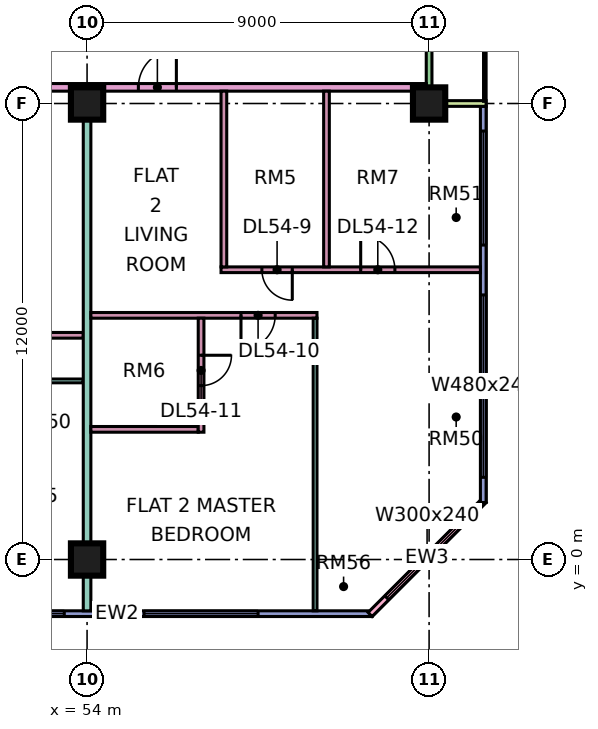
"""IFC4 building model, lengths in metres.
Left out: names, types, materials, properties, quantities, classifications, styles, units other than length and angle.
Written with IfcOpenShell. Run it as: python <this file> out.ifc"""

import sys

from ifc_helpers import new_model, si_unit, direction, frame, frame_2d, origin, origin_2d, place, context, subcontext, project, spatial, rectangle, extrude, element, fill, save


model = new_model("IFC4")
c1 = context("Model", 3, precision=1e-05, world=origin(), true_north=direction((0.0, 1.0)))
c2 = subcontext(c1, "Body", "Model", "MODEL_VIEW")
j1 = project(units=[si_unit("LENGTHUNIT", "METRE"), si_unit("PLANEANGLEUNIT", "RADIAN")], contexts=[c1])
p1 = place(None, origin())
s1 = spatial("IfcSite", under=j1, at=p1, CompositionType="ELEMENT")
p2 = place(p1, origin())
s2 = spatial("IfcBuilding", under=s1, at=p2, CompositionType="ELEMENT")
p3 = place(p2, frame((0.0, 0.0, 230.4)))
s3 = spatial("IfcBuildingStorey", under=s2, at=p3, CompositionType="ELEMENT", Elevation=230.4)
for number, where, z_axis, x_axis in (
    (1, (54.0, 0.0, 0.0), (0.0, 0.0, 1.0), (1.0, 0.0, 0.0)),
    (2, (54.0, 12.0, 0.0), (0.0, 0.0, 1.0), (1.0, 0.0, 0.0)),
    (3, (63.0, 12.0, 0.0), (0.0, 0.0, 1.0), (1.0, 0.0, 0.0)),
):
    element("IfcColumn", number, at=place(p3, frame(where, z_axis=z_axis, x_axis=x_axis)), inside=s3, PredefinedType="COLUMN", context=c2, shape_type="SweptSolid", body=[
        extrude(rectangle(XDim=0.85, YDim=0.85, at=origin_2d()), origin(), (0.0, 0.0, 1.0), 3.75),
    ])
p4 = place(p3, frame((48.075, -1.425, 0.0), z_axis=(0.0, 0.0, 1.0), x_axis=(1.0, 0.0, 0.0)))
e4 = element("IfcWall", 4, at=p4, inside=s3, PredefinedType="SOLIDWALL", context=c2, shape_type="SweptSolid", body=[
    extrude(rectangle(XDim=13.425, YDim=0.15, at=frame_2d((6.712, 0.0))), origin(), (0.0, 0.0, 1.0), 3.35),
])
p5 = place(p4, frame((0.562, 0.0, 0.45)))
e5 = element("IfcOpeningElement", 5, at=p5, cuts=e4, PredefinedType="OPENING", context=c2, shape_type="SweptSolid", body=[
    extrude(rectangle(XDim=1.8, YDim=2.4, at=frame_2d((0.9, 1.2))), frame((0.0, 0.085, 0.0), z_axis=(0.0, -1.0, 0.0), x_axis=(1.0, 0.0, 0.0)), (0.0, 0.0, 1.0), 0.17),
])
p6 = place(p4, frame((3.525, 0.0, 0.45)))
e6 = element("IfcOpeningElement", 6, at=p6, cuts=e4, PredefinedType="OPENING", context=c2, shape_type="SweptSolid", body=[
    extrude(rectangle(XDim=1.8, YDim=2.4, at=frame_2d((0.9, 1.2))), frame((0.0, 0.085, 0.0), z_axis=(0.0, -1.0, 0.0), x_axis=(1.0, 0.0, 0.0)), (0.0, 0.0, 1.0), 0.17),
])
p7 = place(p4, frame((7.425, 0.0, 0.45)))
e7 = element("IfcOpeningElement", 7, at=p7, cuts=e4, PredefinedType="OPENING", context=c2, shape_type="SweptSolid", body=[
    extrude(rectangle(XDim=3.0, YDim=2.4, at=frame_2d((1.5, 1.2))), frame((0.0, 0.085, 0.0), z_axis=(0.0, -1.0, 0.0), x_axis=(1.0, 0.0, 0.0)), (0.0, 0.0, 1.0), 0.17),
])
p8 = place(p3, frame((61.447, -1.447, 0.0), z_axis=(0.0, 0.0, 1.0), x_axis=(0.707106781187, 0.707106781187, 0.0)))
e8 = element("IfcWall", 8, at=p8, inside=s3, PredefinedType="SOLIDWALL", context=c2, shape_type="SweptSolid", body=[
    extrude(rectangle(XDim=4.243, YDim=0.15, at=frame_2d((2.121, 0.0))), origin(), (0.0, 0.0, 1.0), 3.35),
])
p9 = place(p8, frame((0.621, 0.0, 0.45)))
e9 = element("IfcOpeningElement", 9, at=p9, cuts=e8, PredefinedType="OPENING", context=c2, shape_type="SweptSolid", body=[
    extrude(rectangle(XDim=3.0, YDim=2.4, at=frame_2d((1.5, 1.2))), frame((0.0, 0.085, 0.0), z_axis=(0.0, -1.0, 0.0), x_axis=(1.0, 0.0, 0.0)), (0.0, 0.0, 1.0), 0.17),
])
p10 = place(p3, frame((64.425, 1.5, 0.0), z_axis=(0.0, 0.0, 1.0), x_axis=(0.0, 1.0, 0.0)))
e10 = element("IfcWall", 10, at=p10, inside=s3, PredefinedType="SOLIDWALL", context=c2, shape_type="SweptSolid", body=[
    extrude(rectangle(XDim=10.425, YDim=0.15, at=frame_2d((5.212, 0.0))), origin(), (0.0, 0.0, 1.0), 3.35),
])
p11 = place(p10, frame((0.663, 0.0, 0.45)))
e11 = element("IfcOpeningElement", 11, at=p11, cuts=e10, PredefinedType="OPENING", context=c2, shape_type="SweptSolid", body=[
    extrude(rectangle(XDim=4.8, YDim=2.4, at=frame_2d((2.4, 1.2))), frame((0.0, 0.085, 0.0), z_axis=(0.0, -1.0, 0.0), x_axis=(1.0, 0.0, 0.0)), (0.0, 0.0, 1.0), 0.17),
])
p12 = place(p10, frame((6.775, 0.0, 0.45)))
e12 = element("IfcOpeningElement", 12, at=p12, cuts=e10, PredefinedType="OPENING", context=c2, shape_type="SweptSolid", body=[
    extrude(rectangle(XDim=3.0, YDim=2.4, at=frame_2d((1.5, 1.2))), frame((0.0, 0.085, 0.0), z_axis=(0.0, -1.0, 0.0), x_axis=(1.0, 0.0, 0.0)), (0.0, 0.0, 1.0), 0.17),
])
p13 = place(p3, frame((63.0, 12.075, 0.0), z_axis=(0.0, 0.0, 1.0), x_axis=(0.0, 1.0, 0.0)))
e13 = element("IfcWall", 13, at=p13, inside=s3, PredefinedType="SOLIDWALL", context=c2, shape_type="SweptSolid", body=[
    extrude(rectangle(XDim=10.35, YDim=0.15, at=frame_2d((5.175, 0.0))), origin(), (0.0, 0.0, 1.0), 3.35),
])
p14 = place(p13, frame((3.975, 0.0, 0.45)))
e14 = element("IfcOpeningElement", 14, at=p14, cuts=e13, PredefinedType="OPENING", context=c2, shape_type="SweptSolid", body=[
    extrude(rectangle(XDim=1.8, YDim=2.4, at=frame_2d((0.9, 1.2))), frame((0.0, 0.085, 0.0), z_axis=(0.0, -1.0, 0.0), x_axis=(1.0, 0.0, 0.0)), (0.0, 0.0, 1.0), 0.17),
])
p15 = place(p13, frame((7.387, 0.0, 0.0)))
e15 = element("IfcOpeningElement", 15, at=p15, cuts=e13, PredefinedType="OPENING", context=c2, shape_type="SweptSolid", body=[
    extrude(rectangle(XDim=1.8, YDim=2.4, at=frame_2d((0.9, 1.2))), frame((0.0, 0.085, 0.0), z_axis=(0.0, -1.0, 0.0), x_axis=(1.0, 0.0, 0.0)), (0.0, 0.0, 1.0), 0.17),
])
p16 = place(p3, frame((64.5, 12.0, 0.0), z_axis=(0.0, 0.0, 1.0), x_axis=(-1.0, 0.0, 0.0)))
e16 = element("IfcWall", 16, at=p16, inside=s3, PredefinedType="SOLIDWALL", context=c2, shape_type="SweptSolid", body=[
    extrude(rectangle(XDim=1.5, YDim=0.15, at=frame_2d((0.75, 0.0))), origin(), (0.0, 0.0, 1.0), 3.35),
])
p17 = place(p3, frame((33.05, 4.7, 0.0), z_axis=(0.0, 0.0, 1.0), x_axis=(1.0, 0.0, 0.0)))
e17 = element("IfcWall", 17, at=p17, inside=s3, PredefinedType="PARTITIONING", context=c2, shape_type="SweptSolid", body=[
    extrude(rectangle(XDim=20.85, YDim=0.1, at=frame_2d((10.425, 0.0))), origin(), (0.0, 0.0, 1.0), 3.35),
])
p18 = place(p17, frame((1.0, 0.0, 0.0)))
e18 = element("IfcOpeningElement", 18, at=p18, cuts=e17, PredefinedType="OPENING", context=c2, shape_type="SweptSolid", body=[
    extrude(rectangle(XDim=0.9, YDim=2.1, at=frame_2d((0.45, 1.05))), frame((0.0, 0.06, 0.0), z_axis=(0.0, -1.0, 0.0), x_axis=(1.0, 0.0, 0.0)), (0.0, 0.0, 1.0), 0.12),
])
p19 = place(p17, frame((4.0, 0.0, 0.0)))
e19 = element("IfcOpeningElement", 19, at=p19, cuts=e17, PredefinedType="OPENING", context=c2, shape_type="SweptSolid", body=[
    extrude(rectangle(XDim=0.9, YDim=2.1, at=frame_2d((0.45, 1.05))), frame((0.0, 0.06, 0.0), z_axis=(0.0, -1.0, 0.0), x_axis=(1.0, 0.0, 0.0)), (0.0, 0.0, 1.0), 0.12),
])
p20 = place(p17, frame((7.0, 0.0, 0.0)))
e20 = element("IfcOpeningElement", 20, at=p20, cuts=e17, PredefinedType="OPENING", context=c2, shape_type="SweptSolid", body=[
    extrude(rectangle(XDim=0.9, YDim=2.1, at=frame_2d((0.45, 1.05))), frame((0.0, 0.06, 0.0), z_axis=(0.0, -1.0, 0.0), x_axis=(1.0, 0.0, 0.0)), (0.0, 0.0, 1.0), 0.12),
])
p21 = place(p17, frame((19.0, 0.0, 0.0)))
e21 = element("IfcOpeningElement", 21, at=p21, cuts=e17, PredefinedType="OPENING", context=c2, shape_type="SweptSolid", body=[
    extrude(rectangle(XDim=0.9, YDim=2.1, at=frame_2d((0.45, 1.05))), frame((0.0, 0.06, 0.0), z_axis=(0.0, -1.0, 0.0), x_axis=(1.0, 0.0, 0.0)), (0.0, 0.0, 1.0), 0.12),
])
p22 = place(p17, frame((13.0, 0.0, 0.0)))
e22 = element("IfcOpeningElement", 22, at=p22, cuts=e17, PredefinedType="OPENING", context=c2, shape_type="SweptSolid", body=[
    extrude(rectangle(XDim=0.9, YDim=2.1, at=frame_2d((0.45, 1.05))), frame((0.0, 0.06, 0.0), z_axis=(0.0, -1.0, 0.0), x_axis=(1.0, 0.0, 0.0)), (0.0, 0.0, 1.0), 0.12),
])
p23 = place(p3, frame((40.65, 12.425, 0.0), z_axis=(0.0, 0.0, 1.0), x_axis=(1.0, 0.0, 0.0)))
e23 = element("IfcWall", 23, at=p23, inside=s3, PredefinedType="PARTITIONING", context=c2, shape_type="SweptSolid", body=[
    extrude(rectangle(XDim=22.276, YDim=0.2, at=frame_2d((11.138, 0.0))), origin(), (0.0, 0.0, 1.0), 3.35),
])
p24 = place(p23, frame((14.7, 0.0, 0.0)))
e24 = element("IfcOpeningElement", 24, at=p24, cuts=e23, PredefinedType="OPENING", context=c2, shape_type="SweptSolid", body=[
    extrude(rectangle(XDim=1.0, YDim=2.1, at=frame_2d((0.5, 1.05))), frame((0.0, 0.11, 0.0), z_axis=(0.0, -1.0, 0.0), x_axis=(1.0, 0.0, 0.0)), (0.0, 0.0, 1.0), 0.22),
])
p25 = place(p23, frame((1.05, 0.0, 0.0)))
e25 = element("IfcOpeningElement", 25, at=p25, cuts=e23, PredefinedType="OPENING", context=c2, shape_type="SweptSolid", body=[
    extrude(rectangle(XDim=1.0, YDim=2.1, at=frame_2d((0.5, 1.05))), frame((0.0, 0.11, 0.0), z_axis=(0.0, -1.0, 0.0), x_axis=(1.0, 0.0, 0.0)), (0.0, 0.0, 1.0), 0.22),
])
p26 = place(p3, frame((43.575, 5.9, 0.0), z_axis=(0.0, 0.0, 1.0), x_axis=(1.0, 0.0, 0.0)))
e26 = element("IfcWall", 26, at=p26, inside=s3, PredefinedType="PARTITIONING", context=c2, shape_type="SweptSolid", body=[
    extrude(rectangle(XDim=10.325, YDim=0.15, at=frame_2d((5.163, 0.0))), origin(), (0.0, 0.0, 1.0), 3.35),
])
p27 = place(p26, frame((1.825, 0.0, 0.0)))
e27 = element("IfcOpeningElement", 27, at=p27, cuts=e26, PredefinedType="OPENING", context=c2, shape_type="SweptSolid", body=[
    extrude(rectangle(XDim=0.8, YDim=2.1, at=frame_2d((0.4, 1.05))), frame((0.0, 0.085, 0.0), z_axis=(0.0, -1.0, 0.0), x_axis=(1.0, 0.0, 0.0)), (0.0, 0.0, 1.0), 0.17),
])
p28 = place(p26, frame((6.975, 0.0, 0.0)))
e28 = element("IfcOpeningElement", 28, at=p28, cuts=e26, PredefinedType="OPENING", context=c2, shape_type="SweptSolid", body=[
    extrude(rectangle(XDim=0.9, YDim=2.1, at=frame_2d((0.45, 1.05))), frame((0.0, 0.085, 0.0), z_axis=(0.0, -1.0, 0.0), x_axis=(1.0, 0.0, 0.0)), (0.0, 0.0, 1.0), 0.17),
])
p29 = place(p3, frame((54.0, -1.351, 0.0), z_axis=(0.0, 0.0, 1.0), x_axis=(0.0, 1.0, 0.0)))
e29 = element("IfcWall", 29, at=p29, inside=s3, PredefinedType="PARTITIONING", context=c2, shape_type="SweptSolid", body=[
    extrude(rectangle(XDim=13.676, YDim=0.2, at=frame_2d((6.838, 0.0))), origin(), (0.0, 0.0, 1.0), 3.35),
])
p30 = place(p3, frame((54.1, 3.425, 0.0), z_axis=(0.0, 0.0, 1.0), x_axis=(1.0, 0.0, 0.0)))
e30 = element("IfcWall", 30, at=p30, inside=s3, PredefinedType="PARTITIONING", context=c2, shape_type="SweptSolid", body=[
    extrude(rectangle(XDim=2.825, YDim=0.15, at=frame_2d((1.413, 0.0))), origin(), (0.0, 0.0, 1.0), 3.35),
])
p31 = place(p3, frame((54.1, 6.425, 0.0), z_axis=(0.0, 0.0, 1.0), x_axis=(1.0, 0.0, 0.0)))
e31 = element("IfcWall", 31, at=p31, inside=s3, PredefinedType="PARTITIONING", context=c2, shape_type="SweptSolid", body=[
    extrude(rectangle(XDim=5.95, YDim=0.15, at=frame_2d((2.975, 0.0))), origin(), (0.0, 0.0, 1.0), 3.35),
])
p32 = place(p31, frame((3.95, 0.0, 0.0)))
e32 = element("IfcOpeningElement", 32, at=p32, cuts=e31, PredefinedType="OPENING", context=c2, shape_type="SweptSolid", body=[
    extrude(rectangle(XDim=0.9, YDim=2.1, at=frame_2d((0.45, 1.05))), frame((0.0, 0.085, 0.0), z_axis=(0.0, -1.0, 0.0), x_axis=(1.0, 0.0, 0.0)), (0.0, 0.0, 1.0), 0.17),
])
p33 = place(p3, frame((57.0, 3.35, 0.0), z_axis=(0.0, 0.0, 1.0), x_axis=(0.0, 1.0, 0.0)))
e33 = element("IfcWall", 33, at=p33, inside=s3, PredefinedType="PARTITIONING", context=c2, shape_type="SweptSolid", body=[
    extrude(rectangle(XDim=3.0, YDim=0.15, at=frame_2d((1.5, 0.0))), origin(), (0.0, 0.0, 1.0), 3.35),
])
p34 = place(p33, frame((1.225, 0.0, 0.0)))
e34 = element("IfcOpeningElement", 34, at=p34, cuts=e33, PredefinedType="OPENING", context=c2, shape_type="SweptSolid", body=[
    extrude(rectangle(XDim=0.8, YDim=2.1, at=frame_2d((0.4, 1.05))), frame((0.0, 0.085, 0.0), z_axis=(0.0, -1.0, 0.0), x_axis=(1.0, 0.0, 0.0)), (0.0, 0.0, 1.0), 0.17),
])
p35 = place(p3, frame((57.525, 7.625, 0.0), z_axis=(0.0, 0.0, 1.0), x_axis=(1.0, 0.0, 0.0)))
e35 = element("IfcWall", 35, at=p35, inside=s3, PredefinedType="PARTITIONING", context=c2, shape_type="SweptSolid", body=[
    extrude(rectangle(XDim=6.825, YDim=0.15, at=frame_2d((3.413, 0.0))), origin(), (0.0, 0.0, 1.0), 3.35),
])
p36 = place(p35, frame((1.075, 0.0, 0.0)))
e36 = element("IfcOpeningElement", 36, at=p36, cuts=e35, PredefinedType="OPENING", context=c2, shape_type="SweptSolid", body=[
    extrude(rectangle(XDim=0.8, YDim=2.1, at=frame_2d((0.4, 1.05))), frame((0.0, 0.085, 0.0), z_axis=(0.0, -1.0, 0.0), x_axis=(1.0, 0.0, 0.0)), (0.0, 0.0, 1.0), 0.17),
])
p37 = place(p35, frame((3.675, 0.0, 0.0)))
e37 = element("IfcOpeningElement", 37, at=p37, cuts=e35, PredefinedType="OPENING", context=c2, shape_type="SweptSolid", body=[
    extrude(rectangle(XDim=0.9, YDim=2.1, at=frame_2d((0.45, 1.05))), frame((0.0, 0.085, 0.0), z_axis=(0.0, -1.0, 0.0), x_axis=(1.0, 0.0, 0.0)), (0.0, 0.0, 1.0), 0.17),
])
p38 = place(p3, frame((57.6, 7.7, 0.0), z_axis=(0.0, 0.0, 1.0), x_axis=(0.0, 1.0, 0.0)))
e38 = element("IfcWall", 38, at=p38, inside=s3, PredefinedType="PARTITIONING", context=c2, shape_type="SweptSolid", body=[
    extrude(rectangle(XDim=4.625, YDim=0.15, at=frame_2d((2.312, 0.0))), origin(), (0.0, 0.0, 1.0), 3.35),
])
p39 = place(p3, frame((60.0, -1.35, 0.0), z_axis=(0.0, 0.0, 1.0), x_axis=(0.0, 1.0, 0.0)))
e39 = element("IfcWall", 39, at=p39, inside=s3, PredefinedType="PARTITIONING", context=c2, shape_type="SweptSolid", body=[
    extrude(rectangle(XDim=7.7, YDim=0.1, at=frame_2d((3.85, 0.0))), origin(), (0.0, 0.0, 1.0), 3.35),
])
p40 = place(p3, frame((60.3, 7.7, 0.0), z_axis=(0.0, 0.0, 1.0), x_axis=(0.0, 1.0, 0.0)))
e40 = element("IfcWall", 40, at=p40, inside=s3, PredefinedType="PARTITIONING", context=c2, shape_type="SweptSolid", body=[
    extrude(rectangle(XDim=4.625, YDim=0.15, at=frame_2d((2.312, 0.0))), origin(), (0.0, 0.0, 1.0), 3.35),
])
p41 = place(p6, origin())
e41 = element("IfcWindow", 41, at=p41, inside=s3, PartitioningType="SINGLE_PANEL", PredefinedType="WINDOW", context=c2, shape_type="SweptSolid", body=[
    extrude(rectangle(XDim=1.8, YDim=2.4, at=frame_2d((0.9, 1.2))), frame((0.0, 0.03, 0.0), z_axis=(0.0, -1.0, 0.0), x_axis=(1.0, 0.0, 0.0)), (0.0, 0.0, 1.0), 0.06),
])
fill(e6, e41)
p42 = place(p7, origin())
e42 = element("IfcWindow", 42, at=p42, inside=s3, PartitioningType="SINGLE_PANEL", PredefinedType="WINDOW", context=c2, shape_type="SweptSolid", body=[
    extrude(rectangle(XDim=3.0, YDim=2.4, at=frame_2d((1.5, 1.2))), frame((0.0, 0.03, 0.0), z_axis=(0.0, -1.0, 0.0), x_axis=(1.0, 0.0, 0.0)), (0.0, 0.0, 1.0), 0.06),
])
fill(e7, e42)
p43 = place(p9, origin())
e43 = element("IfcWindow", 43, at=p43, inside=s3, PartitioningType="SINGLE_PANEL", PredefinedType="WINDOW", context=c2, shape_type="SweptSolid", body=[
    extrude(rectangle(XDim=3.0, YDim=2.4, at=frame_2d((1.5, 1.2))), frame((0.0, 0.03, 0.0), z_axis=(0.0, -1.0, 0.0), x_axis=(1.0, 0.0, 0.0)), (0.0, 0.0, 1.0), 0.06),
])
fill(e9, e43)
p44 = place(p11, origin())
e44 = element("IfcWindow", 44, at=p44, inside=s3, PartitioningType="SINGLE_PANEL", PredefinedType="WINDOW", context=c2, shape_type="SweptSolid", body=[
    extrude(rectangle(XDim=4.8, YDim=2.4, at=frame_2d((2.4, 1.2))), frame((0.0, 0.03, 0.0), z_axis=(0.0, -1.0, 0.0), x_axis=(1.0, 0.0, 0.0)), (0.0, 0.0, 1.0), 0.06),
])
fill(e11, e44)
p45 = place(p12, origin())
e45 = element("IfcWindow", 45, at=p45, inside=s3, PartitioningType="SINGLE_PANEL", PredefinedType="WINDOW", context=c2, shape_type="SweptSolid", body=[
    extrude(rectangle(XDim=3.0, YDim=2.4, at=frame_2d((1.5, 1.2))), frame((0.0, 0.03, 0.0), z_axis=(0.0, -1.0, 0.0), x_axis=(1.0, 0.0, 0.0)), (0.0, 0.0, 1.0), 0.06),
])
fill(e12, e45)
p46 = place(p36, origin())
e46 = element("IfcDoor", 46, at=p46, inside=s3, OperationType="SINGLE_SWING_RIGHT", PredefinedType="DOOR", context=c2, shape_type="SweptSolid", body=[
    extrude(rectangle(XDim=0.8, YDim=2.1, at=frame_2d((0.4, 1.05))), frame((0.0, 0.025, 0.0), z_axis=(0.0, -1.0, 0.0), x_axis=(1.0, 0.0, 0.0)), (0.0, 0.0, 1.0), 0.05),
])
fill(e36, e46)
p47 = place(p32, frame((0.9, 0.0, 0.0), z_axis=(0.0, 0.0, 1.0), x_axis=(-1.0, 0.0, 0.0)))
e47 = element("IfcDoor", 47, at=p47, inside=s3, OperationType="SINGLE_SWING_LEFT", PredefinedType="DOOR", context=c2, shape_type="SweptSolid", body=[
    extrude(rectangle(XDim=0.9, YDim=2.1, at=frame_2d((0.45, 1.05))), frame((0.0, 0.025, 0.0), z_axis=(0.0, -1.0, 0.0), x_axis=(1.0, 0.0, 0.0)), (0.0, 0.0, 1.0), 0.05),
])
fill(e32, e47)
p48 = place(p34, origin())
e48 = element("IfcDoor", 48, at=p48, inside=s3, OperationType="SINGLE_SWING_RIGHT", PredefinedType="DOOR", context=c2, shape_type="SweptSolid", body=[
    extrude(rectangle(XDim=0.8, YDim=2.1, at=frame_2d((0.4, 1.05))), frame((0.0, 0.025, 0.0), z_axis=(0.0, -1.0, 0.0), x_axis=(1.0, 0.0, 0.0)), (0.0, 0.0, 1.0), 0.05),
])
fill(e34, e48)
p49 = place(p37, origin())
e49 = element("IfcDoor", 49, at=p49, inside=s3, OperationType="SINGLE_SWING_LEFT", PredefinedType="DOOR", context=c2, shape_type="SweptSolid", body=[
    extrude(rectangle(XDim=0.9, YDim=2.1, at=frame_2d((0.45, 1.05))), frame((0.0, 0.025, 0.0), z_axis=(0.0, -1.0, 0.0), x_axis=(1.0, 0.0, 0.0)), (0.0, 0.0, 1.0), 0.05),
])
fill(e37, e49)
p50 = place(p24, frame((1.0, 0.0, 0.0), z_axis=(0.0, 0.0, 1.0), x_axis=(-1.0, 0.0, 0.0)))
e50 = element("IfcDoor", 50, at=p50, inside=s3, OperationType="SINGLE_SWING_RIGHT", PredefinedType="DOOR", context=c2, shape_type="SweptSolid", body=[
    extrude(rectangle(XDim=1.0, YDim=2.1, at=frame_2d((0.5, 1.05))), frame((0.0, 0.025, 0.0), z_axis=(0.0, -1.0, 0.0), x_axis=(1.0, 0.0, 0.0)), (0.0, 0.0, 1.0), 0.05),
])
fill(e24, e50)
save(model, sys.argv[1])
